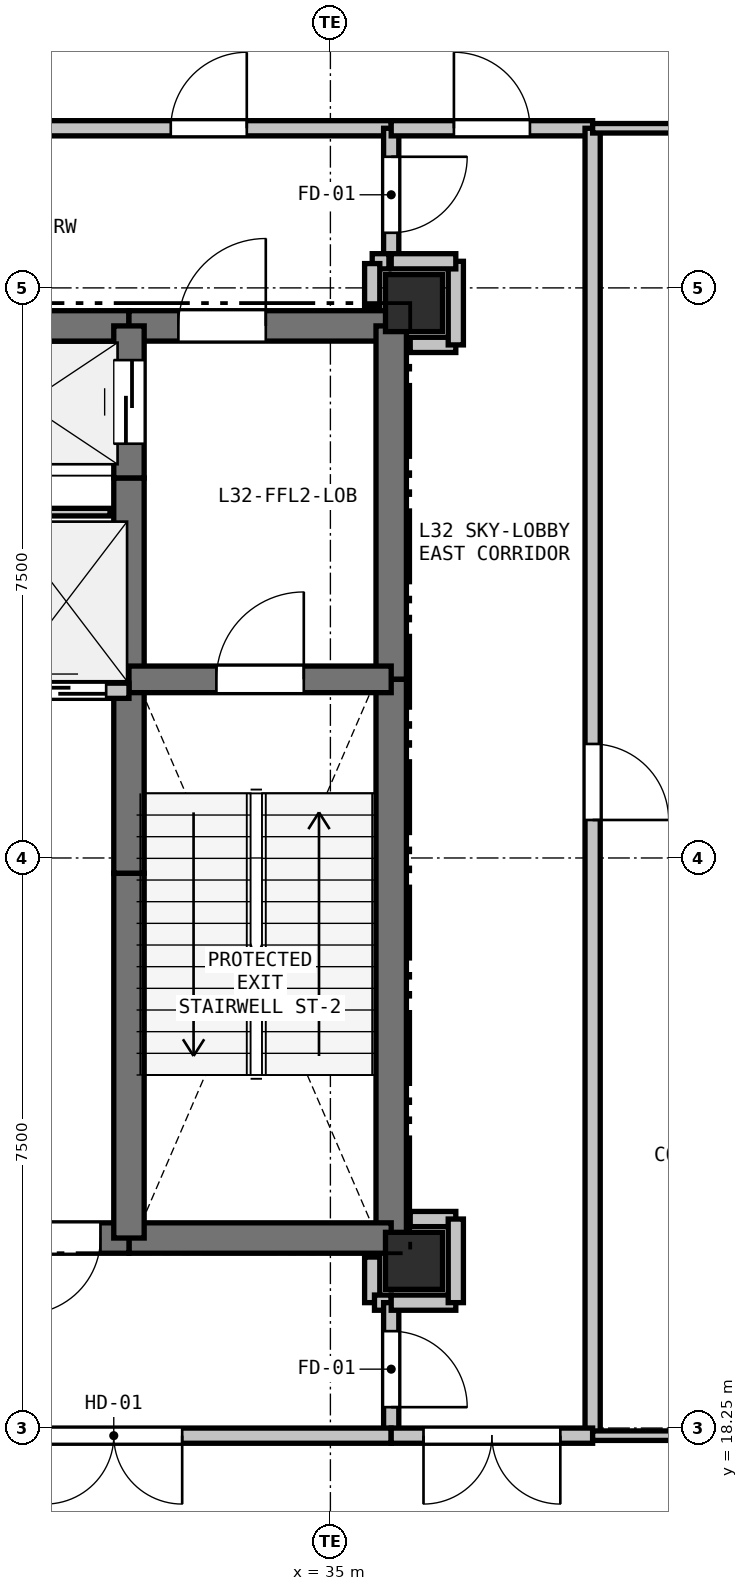
"""IFC4 building model, lengths in metres.
Left out: names, types, materials, properties, quantities, classifications, styles, units other than length and angle.
Written with IfcOpenShell. Run it as: python <this file> out.ifc"""

import sys

from ifc_helpers import new_model, si_unit, direction, frame, frame_2d, origin, origin_2d, place, context, subcontext, project, spatial, rectangle, extrude, element, fill, save


model = new_model("IFC4")
c1 = context("Model", 3, precision=1e-05, world=origin(), true_north=direction((0.0, 1.0)))
c2 = subcontext(c1, "Body", "Model", "MODEL_VIEW")
j1 = project(units=[si_unit("LENGTHUNIT", "METRE"), si_unit("PLANEANGLEUNIT", "RADIAN")], contexts=[c1])
p1 = place(None, origin())
s1 = spatial("IfcSite", under=j1, at=p1, CompositionType="ELEMENT")
p2 = place(p1, origin())
s2 = spatial("IfcBuilding", under=s1, at=p2, CompositionType="ELEMENT")
p3 = place(p2, frame((0.0, 0.0, 116.4)))
s3 = spatial("IfcBuildingStorey", under=s2, at=p3, CompositionType="ELEMENT", Elevation=116.4)
for number, where, z_axis, x_axis in (
    (1, (36.1, 33.05, 0.0), (0.0, 0.0, 1.0), (1.0, 0.0, 0.0)),
    (2, (36.1, 20.45, 0.0), (0.0, 0.0, 1.0), (1.0, 0.0, 0.0)),
):
    element("IfcColumn", number, at=place(p3, frame(where, z_axis=z_axis, x_axis=x_axis)), inside=s3, PredefinedType="COLUMN", context=c2, shape_type="SweptSolid", body=[
        extrude(rectangle(XDim=0.75, YDim=0.75, at=origin_2d()), origin(), (0.0, 0.0, 1.0), 4.8),
    ])
p4 = place(p3, frame((29.65, 32.75, 0.0), z_axis=(0.0, 0.0, 1.0), x_axis=(1.0, 0.0, 0.0)))
e3 = element("IfcWall", 3, at=p4, inside=s3, PredefinedType="SHEAR", context=c2, shape_type="SweptSolid", body=[
    extrude(rectangle(XDim=2.7, YDim=0.4, at=frame_2d((1.35, 0.0))), origin(), (0.0, 0.0, 1.0), 4.56),
])
p5 = place(p3, frame((32.35, 32.75, 0.0), z_axis=(0.0, 0.0, 1.0), x_axis=(1.0, 0.0, 0.0)))
e4 = element("IfcWall", 4, at=p5, inside=s3, PredefinedType="SHEAR", context=c2, shape_type="SweptSolid", body=[
    extrude(rectangle(XDim=3.45, YDim=0.4, at=frame_2d((1.725, 0.0))), origin(), (0.0, 0.0, 1.0), 4.56),
])
p6 = place(p5, frame((0.65, 0.0, 0.0)))
e5 = element("IfcOpeningElement", 5, at=p6, cuts=e4, PredefinedType="OPENING", context=c2, shape_type="SweptSolid", body=[
    extrude(rectangle(XDim=1.15, YDim=2.15, at=frame_2d((0.575, 1.075))), frame((0.0, 0.21, 0.0), z_axis=(0.0, -1.0, 0.0), x_axis=(1.0, 0.0, 0.0)), (0.0, 0.0, 1.0), 0.42),
])
p7 = place(p3, frame((35.8, 32.75, 0.0), z_axis=(0.0, 0.0, 1.0), x_axis=(0.0, -1.0, 0.0)))
e6 = element("IfcWall", 6, at=p7, inside=s3, PredefinedType="SHEAR", context=c2, shape_type="SweptSolid", body=[
    extrude(rectangle(XDim=4.65, YDim=0.4, at=frame_2d((2.325, 0.0))), origin(), (0.0, 0.0, 1.0), 4.56),
])
p8 = place(p3, frame((35.8, 28.1, 0.0), z_axis=(0.0, 0.0, 1.0), x_axis=(0.0, -1.0, 0.0)))
e7 = element("IfcWall", 7, at=p8, inside=s3, PredefinedType="SHEAR", context=c2, shape_type="SweptSolid", body=[
    extrude(rectangle(XDim=7.35, YDim=0.4, at=frame_2d((3.675, 0.0))), origin(), (0.0, 0.0, 1.0), 4.56),
])
p9 = place(p3, frame((35.8, 20.75, 0.0), z_axis=(0.0, 0.0, 1.0), x_axis=(-1.0, 0.0, 0.0)))
e8 = element("IfcWall", 8, at=p9, inside=s3, PredefinedType="SHEAR", context=c2, shape_type="SweptSolid", body=[
    extrude(rectangle(XDim=3.45, YDim=0.4, at=frame_2d((1.725, 0.0))), origin(), (0.0, 0.0, 1.0), 4.56),
])
p10 = place(p3, frame((32.35, 20.75, 0.0), z_axis=(0.0, 0.0, 1.0), x_axis=(-1.0, 0.0, 0.0)))
e9 = element("IfcWall", 9, at=p10, inside=s3, PredefinedType="SHEAR", context=c2, shape_type="SweptSolid", body=[
    extrude(rectangle(XDim=1.75, YDim=0.4, at=frame_2d((0.875, 0.0))), origin(), (0.0, 0.0, 1.0), 4.56),
])
p11 = place(p10, frame((0.375, 0.0, 0.0)))
e10 = element("IfcOpeningElement", 10, at=p11, cuts=e9, PredefinedType="OPENING", context=c2, shape_type="SweptSolid", body=[
    extrude(rectangle(XDim=1.0, YDim=2.15, at=frame_2d((0.5, 1.075))), frame((0.0, 0.21, 0.0), z_axis=(0.0, -1.0, 0.0), x_axis=(1.0, 0.0, 0.0)), (0.0, 0.0, 1.0), 0.42),
])
p12 = place(p3, frame((32.35, 20.75, 0.0), z_axis=(0.0, 0.0, 1.0), x_axis=(0.0, 1.0, 0.0)))
e11 = element("IfcWall", 11, at=p12, inside=s3, PredefinedType="SHEAR", context=c2, shape_type="SweptSolid", body=[
    extrude(rectangle(XDim=4.8, YDim=0.4, at=frame_2d((2.4, 0.0))), origin(), (0.0, 0.0, 1.0), 4.56),
])
p13 = place(p3, frame((32.35, 25.55, 0.0), z_axis=(0.0, 0.0, 1.0), x_axis=(0.0, 1.0, 0.0)))
e12 = element("IfcWall", 12, at=p13, inside=s3, PredefinedType="SHEAR", context=c2, shape_type="SweptSolid", body=[
    extrude(rectangle(XDim=2.4, YDim=0.4, at=frame_2d((1.2, 0.0))), origin(), (0.0, 0.0, 1.0), 4.56),
])
p14 = place(p3, frame((32.35, 27.95, 0.0), z_axis=(0.0, 0.0, 1.0), x_axis=(0.0, 1.0, 0.0)))
e13 = element("IfcWall", 13, at=p14, inside=s3, PredefinedType="SHEAR", context=c2, shape_type="SweptSolid", body=[
    extrude(rectangle(XDim=2.8, YDim=0.4, at=frame_2d((1.4, 0.0))), origin(), (0.0, 0.0, 1.0), 4.56),
])
p15 = place(p3, frame((32.35, 30.75, 0.0), z_axis=(0.0, 0.0, 1.0), x_axis=(0.0, 1.0, 0.0)))
e14 = element("IfcWall", 14, at=p15, inside=s3, PredefinedType="SHEAR", context=c2, shape_type="SweptSolid", body=[
    extrude(rectangle(XDim=2.0, YDim=0.4, at=frame_2d((1.0, 0.0))), origin(), (0.0, 0.0, 1.0), 4.56),
])
p16 = place(p15, frame((0.45, 0.0, 0.0)))
e15 = element("IfcOpeningElement", 15, at=p16, cuts=e14, PredefinedType="OPENING", context=c2, shape_type="SweptSolid", body=[
    extrude(rectangle(XDim=1.1, YDim=2.15, at=frame_2d((0.55, 1.075))), frame((0.0, 0.21, 0.0), z_axis=(0.0, -1.0, 0.0), x_axis=(1.0, 0.0, 0.0)), (0.0, 0.0, 1.0), 0.42),
])
p17 = place(p3, frame((32.35, 28.1, 0.0), z_axis=(0.0, 0.0, 1.0), x_axis=(1.0, 0.0, 0.0)))
e16 = element("IfcWall", 16, at=p17, inside=s3, PredefinedType="SHEAR", context=c2, shape_type="SweptSolid", body=[
    extrude(rectangle(XDim=3.45, YDim=0.35, at=frame_2d((1.725, 0.0))), origin(), (0.0, 0.0, 1.0), 4.56),
])
p18 = place(p17, frame((1.15, 0.0, 0.0)))
e17 = element("IfcOpeningElement", 17, at=p18, cuts=e16, PredefinedType="OPENING", context=c2, shape_type="SweptSolid", body=[
    extrude(rectangle(XDim=1.15, YDim=2.15, at=frame_2d((0.575, 1.075))), frame((0.0, 0.185, 0.0), z_axis=(0.0, -1.0, 0.0), x_axis=(1.0, 0.0, 0.0)), (0.0, 0.0, 1.0), 0.37),
])
p19 = place(p3, frame((27.4, 27.95, 0.0), z_axis=(0.0, 0.0, 1.0), x_axis=(1.0, 0.0, 0.0)))
e18 = element("IfcWall", 18, at=p19, inside=s3, PredefinedType="PARTITIONING", context=c2, shape_type="SweptSolid", body=[
    extrude(rectangle(XDim=4.95, YDim=0.2, at=frame_2d((2.475, 0.0))), origin(), (0.0, 0.0, 1.0), 4.56),
])
p20 = place(p19, frame((0.25, 0.0, 0.0)))
e19 = element("IfcOpeningElement", 19, at=p20, cuts=e18, PredefinedType="OPENING", context=c2, shape_type="SweptSolid", body=[
    extrude(rectangle(XDim=1.1, YDim=2.15, at=frame_2d((0.55, 1.075))), frame((0.0, 0.11, 0.0), z_axis=(0.0, -1.0, 0.0), x_axis=(1.0, 0.0, 0.0)), (0.0, 0.0, 1.0), 0.22),
])
p21 = place(p19, frame((1.9, 0.0, 0.0)))
e20 = element("IfcOpeningElement", 20, at=p21, cuts=e18, PredefinedType="OPENING", context=c2, shape_type="SweptSolid", body=[
    extrude(rectangle(XDim=1.1, YDim=2.15, at=frame_2d((0.55, 1.075))), frame((0.0, 0.11, 0.0), z_axis=(0.0, -1.0, 0.0), x_axis=(1.0, 0.0, 0.0)), (0.0, 0.0, 1.0), 0.22),
])
p22 = place(p19, frame((3.55, 0.0, 0.0)))
e21 = element("IfcOpeningElement", 21, at=p22, cuts=e18, PredefinedType="OPENING", context=c2, shape_type="SweptSolid", body=[
    extrude(rectangle(XDim=1.1, YDim=2.15, at=frame_2d((0.55, 1.075))), frame((0.0, 0.11, 0.0), z_axis=(0.0, -1.0, 0.0), x_axis=(1.0, 0.0, 0.0)), (0.0, 0.0, 1.0), 0.22),
])
p23 = place(p3, frame((32.1, 30.3, 0.0), z_axis=(0.0, 0.0, 1.0), x_axis=(-1.0, 0.0, 0.0)))
e22 = element("IfcWall", 22, at=p23, inside=s3, PredefinedType="PARTITIONING", context=c2, shape_type="SweptSolid", body=[
    extrude(rectangle(XDim=1.4, YDim=0.1, at=frame_2d((0.7, 0.0))), origin(), (0.0, 0.0, 1.0), 4.56),
])
p24 = place(p3, frame((35.55, 20.5, 0.0), z_axis=(0.0, 0.0, 1.0), x_axis=(0.0, -1.0, 0.0)))
e23 = element("IfcWall", 23, at=p24, inside=s3, PredefinedType="PARTITIONING", context=c2, shape_type="SweptSolid", body=[
    extrude(rectangle(XDim=0.6, YDim=0.2, at=frame_2d((0.3, 0.0))), origin(), (0.0, 0.0, 1.0), 4.008),
])
p25 = place(p3, frame((35.58, 19.9, 0.0), z_axis=(0.0, 0.0, 1.0), x_axis=(1.0, 0.0, 0.0)))
e24 = element("IfcWall", 24, at=p25, inside=s3, PredefinedType="PARTITIONING", context=c2, shape_type="SweptSolid", body=[
    extrude(rectangle(XDim=0.22, YDim=0.2, at=frame_2d((0.11, 0.0))), origin(), (0.0, 0.0, 1.0), 4.56),
])
p26 = place(p3, frame((35.8, 19.9, 0.0), z_axis=(0.0, 0.0, 1.0), x_axis=(0.0, -1.0, 0.0)))
e25 = element("IfcWall", 25, at=p26, inside=s3, PredefinedType="PARTITIONING", context=c2, shape_type="SweptSolid", body=[
    extrude(rectangle(XDim=1.75, YDim=0.2, at=frame_2d((0.875, 0.0))), origin(), (0.0, 0.0, 1.0), 3.195),
])
p27 = place(p26, frame((0.375, 0.0, 0.0)))
e26 = element("IfcOpeningElement", 26, at=p27, cuts=e25, PredefinedType="OPENING", context=c2, shape_type="SweptSolid", body=[
    extrude(rectangle(XDim=1.0, YDim=2.15, at=frame_2d((0.5, 1.075))), frame((0.0, 0.11, 0.0), z_axis=(0.0, -1.0, 0.0), x_axis=(1.0, 0.0, 0.0)), (0.0, 0.0, 1.0), 0.22),
])
p28 = place(p3, frame((35.8, 18.15, 0.0), z_axis=(0.0, 0.0, 1.0), x_axis=(-1.0, 0.0, 0.0)))
e27 = element("IfcWall", 27, at=p28, inside=s3, PredefinedType="PARTITIONING", context=c2, shape_type="SweptSolid", body=[
    extrude(rectangle(XDim=7.3, YDim=0.2, at=frame_2d((3.65, 0.0))), origin(), (0.0, 0.0, 1.0), 2.945),
])
p29 = place(p28, frame((2.75, 0.0, 0.0)))
e28 = element("IfcOpeningElement", 28, at=p29, cuts=e27, PredefinedType="OPENING", context=c2, shape_type="SweptSolid", body=[
    extrude(rectangle(XDim=1.8, YDim=2.2, at=frame_2d((0.9, 1.1))), frame((0.0, 0.11, 0.0), z_axis=(0.0, -1.0, 0.0), x_axis=(1.0, 0.0, 0.0)), (0.0, 0.0, 1.0), 0.22),
])
p30 = place(p3, frame((31.0, 35.35, 0.0), z_axis=(0.0, 0.0, 1.0), x_axis=(1.0, 0.0, 0.0)))
e29 = element("IfcWall", 29, at=p30, inside=s3, PredefinedType="PARTITIONING", context=c2, shape_type="SweptSolid", body=[
    extrude(rectangle(XDim=4.8, YDim=0.2, at=frame_2d((2.4, 0.0))), origin(), (0.0, 0.0, 1.0), 2.945),
])
p31 = place(p30, frame((1.9, 0.0, 0.0)))
e30 = element("IfcOpeningElement", 30, at=p31, cuts=e29, PredefinedType="OPENING", context=c2, shape_type="SweptSolid", body=[
    extrude(rectangle(XDim=1.0, YDim=2.15, at=frame_2d((0.5, 1.075))), frame((0.0, 0.11, 0.0), z_axis=(0.0, -1.0, 0.0), x_axis=(1.0, 0.0, 0.0)), (0.0, 0.0, 1.0), 0.22),
])
p32 = place(p3, frame((35.8, 35.35, 0.0), z_axis=(0.0, 0.0, 1.0), x_axis=(0.0, -1.0, 0.0)))
e31 = element("IfcWall", 31, at=p32, inside=s3, PredefinedType="PARTITIONING", context=c2, shape_type="SweptSolid", body=[
    extrude(rectangle(XDim=1.75, YDim=0.2, at=frame_2d((0.875, 0.0))), origin(), (0.0, 0.0, 1.0), 2.945),
])
p33 = place(p32, frame((0.375, 0.0, 0.0)))
e32 = element("IfcOpeningElement", 32, at=p33, cuts=e31, PredefinedType="OPENING", context=c2, shape_type="SweptSolid", body=[
    extrude(rectangle(XDim=1.0, YDim=2.15, at=frame_2d((0.5, 1.075))), frame((0.0, 0.11, 0.0), z_axis=(0.0, -1.0, 0.0), x_axis=(1.0, 0.0, 0.0)), (0.0, 0.0, 1.0), 0.22),
])
p34 = place(p3, frame((35.77, 33.6, 0.0), z_axis=(0.0, 0.0, 1.0), x_axis=(-1.0, 0.0, 0.0)))
e33 = element("IfcWall", 33, at=p34, inside=s3, PredefinedType="PARTITIONING", context=c2, shape_type="SweptSolid", body=[
    extrude(rectangle(XDim=0.22, YDim=0.2, at=frame_2d((0.11, 0.0))), origin(), (0.0, 0.0, 1.0), 3.195),
])
p35 = place(p3, frame((35.55, 33.57, 0.0), z_axis=(0.0, 0.0, 1.0), x_axis=(0.0, -1.0, 0.0)))
e34 = element("IfcWall", 34, at=p35, inside=s3, PredefinedType="PARTITIONING", context=c2, shape_type="SweptSolid", body=[
    extrude(rectangle(XDim=0.57, YDim=0.2, at=frame_2d((0.285, 0.0))), origin(), (0.0, 0.0, 1.0), 3.195),
])
for number, where, z_axis, x_axis in (
    (35, (36.65, 21.0, 0.0), (0.0, 0.0, 1.0), (-1.0, 0.0, 0.0)),
    (36, (36.05, 32.5, 0.0), (0.0, 0.0, 1.0), (1.0, 0.0, 0.0)),
):
    element("IfcWall", number, at=place(p3, frame(where, z_axis=z_axis, x_axis=x_axis)), inside=s3, PredefinedType="PARTITIONING", context=c2, shape_type="SweptSolid", body=[
        extrude(rectangle(XDim=0.6, YDim=0.2, at=frame_2d((0.3, 0.0))), origin(), (0.0, 0.0, 1.0), 4.008),
    ])
p36 = place(p3, frame((36.65, 32.5, 0.0), z_axis=(0.0, 0.0, 1.0), x_axis=(0.0, 1.0, 0.0)))
e37 = element("IfcWall", 37, at=p36, inside=s3, PredefinedType="PARTITIONING", context=c2, shape_type="SweptSolid", body=[
    extrude(rectangle(XDim=1.1, YDim=0.2, at=frame_2d((0.55, 0.0))), origin(), (0.0, 0.0, 1.0), 3.195),
])
p37 = place(p3, frame((36.65, 33.6, 0.0), z_axis=(0.0, 0.0, 1.0), x_axis=(-1.0, 0.0, 0.0)))
e38 = element("IfcWall", 38, at=p37, inside=s3, PredefinedType="PARTITIONING", context=c2, shape_type="SweptSolid", body=[
    extrude(rectangle(XDim=0.85, YDim=0.2, at=frame_2d((0.425, 0.0))), origin(), (0.0, 0.0, 1.0), 3.195),
])
p38 = place(p3, frame((35.8, 35.35, 0.0), z_axis=(0.0, 0.0, 1.0), x_axis=(1.0, 0.0, 0.0)))
e39 = element("IfcWall", 39, at=p38, inside=s3, PredefinedType="PARTITIONING", context=c2, shape_type="SweptSolid", body=[
    extrude(rectangle(XDim=2.65, YDim=0.2, at=frame_2d((1.325, 0.0))), origin(), (0.0, 0.0, 1.0), 2.945),
])
p39 = place(p38, frame((0.825, 0.0, 0.0)))
e40 = element("IfcOpeningElement", 40, at=p39, cuts=e39, PredefinedType="OPENING", context=c2, shape_type="SweptSolid", body=[
    extrude(rectangle(XDim=1.0, YDim=2.15, at=frame_2d((0.5, 1.075))), frame((0.0, 0.11, 0.0), z_axis=(0.0, -1.0, 0.0), x_axis=(1.0, 0.0, 0.0)), (0.0, 0.0, 1.0), 0.22),
])
p40 = place(p3, frame((38.45, 35.35, 0.0), z_axis=(0.0, 0.0, 1.0), x_axis=(0.0, -1.0, 0.0)))
e41 = element("IfcWall", 41, at=p40, inside=s3, PredefinedType="PARTITIONING", context=c2, shape_type="SweptSolid", body=[
    extrude(rectangle(XDim=17.2, YDim=0.2, at=frame_2d((8.6, 0.0))), origin(), (0.0, 0.0, 1.0), 3.195),
])
p41 = place(p40, frame((8.1, 0.0, 0.0)))
e42 = element("IfcOpeningElement", 42, at=p41, cuts=e41, PredefinedType="OPENING", context=c2, shape_type="SweptSolid", body=[
    extrude(rectangle(XDim=1.0, YDim=2.15, at=frame_2d((0.5, 1.075))), frame((0.0, 0.11, 0.0), z_axis=(0.0, -1.0, 0.0), x_axis=(1.0, 0.0, 0.0)), (0.0, 0.0, 1.0), 0.22),
])
p42 = place(p3, frame((38.45, 18.15, 0.0), z_axis=(0.0, 0.0, 1.0), x_axis=(-1.0, 0.0, 0.0)))
e43 = element("IfcWall", 43, at=p42, inside=s3, PredefinedType="PARTITIONING", context=c2, shape_type="SweptSolid", body=[
    extrude(rectangle(XDim=2.65, YDim=0.2, at=frame_2d((1.325, 0.0))), origin(), (0.0, 0.0, 1.0), 3.195),
])
p43 = place(p42, frame((0.425, 0.0, 0.0)))
e44 = element("IfcOpeningElement", 44, at=p43, cuts=e43, PredefinedType="OPENING", context=c2, shape_type="SweptSolid", body=[
    extrude(rectangle(XDim=1.8, YDim=2.2, at=frame_2d((0.9, 1.1))), frame((0.0, 0.11, 0.0), z_axis=(0.0, -1.0, 0.0), x_axis=(1.0, 0.0, 0.0)), (0.0, 0.0, 1.0), 0.22),
])
p44 = place(p3, frame((35.8, 19.9, 0.0), z_axis=(0.0, 0.0, 1.0), x_axis=(1.0, 0.0, 0.0)))
e45 = element("IfcWall", 45, at=p44, inside=s3, PredefinedType="PARTITIONING", context=c2, shape_type="SweptSolid", body=[
    extrude(rectangle(XDim=0.85, YDim=0.2, at=frame_2d((0.425, 0.0))), origin(), (0.0, 0.0, 1.0), 4.56),
])
p45 = place(p3, frame((36.65, 19.9, 0.0), z_axis=(0.0, 0.0, 1.0), x_axis=(0.0, 1.0, 0.0)))
e46 = element("IfcWall", 46, at=p45, inside=s3, PredefinedType="PARTITIONING", context=c2, shape_type="SweptSolid", body=[
    extrude(rectangle(XDim=1.1, YDim=0.2, at=frame_2d((0.55, 0.0))), origin(), (0.0, 0.0, 1.0), 4.56),
])
for number, where, z_axis, x_axis in (
    (47, (42.885, 35.35, 0.0), (0.0, 0.0, 1.0), (-1.0, 0.0, 0.0)),
    (48, (42.885, 18.15, 0.0), (0.0, 0.0, 1.0), (-1.0, 0.0, 0.0)),
):
    element("IfcWall", number, at=place(p3, frame(where, z_axis=z_axis, x_axis=x_axis)), inside=s3, PredefinedType="PARTITIONING", context=c2, shape_type="SweptSolid", body=[
        extrude(rectangle(XDim=4.436, YDim=0.125, at=frame_2d((2.218, 0.0))), origin(), (0.0, 0.0, 1.0), 2.365),
    ])
p46 = place(p22, origin())
e49 = element("IfcDoor", 49, at=p46, inside=s3, OperationType="SLIDING_TO_LEFT", PredefinedType="DOOR", context=c2, shape_type="SweptSolid", body=[
    extrude(rectangle(XDim=1.1, YDim=2.15, at=frame_2d((0.55, 1.075))), frame((0.0, 0.025, 0.0), z_axis=(0.0, -1.0, 0.0), x_axis=(1.0, 0.0, 0.0)), (0.0, 0.0, 1.0), 0.05),
])
fill(e21, e49)
p47 = place(p11, origin())
e50 = element("IfcDoor", 50, at=p47, inside=s3, OperationType="SINGLE_SWING_RIGHT", PredefinedType="DOOR", context=c2, shape_type="SweptSolid", body=[
    extrude(rectangle(XDim=1.0, YDim=2.15, at=frame_2d((0.5, 1.075))), frame((0.0, 0.025, 0.0), z_axis=(0.0, -1.0, 0.0), x_axis=(1.0, 0.0, 0.0)), (0.0, 0.0, 1.0), 0.05),
])
fill(e10, e50)
p48 = place(p16, origin())
e51 = element("IfcDoor", 51, at=p48, inside=s3, OperationType="SLIDING_TO_LEFT", PredefinedType="DOOR", context=c2, shape_type="SweptSolid", body=[
    extrude(rectangle(XDim=1.1, YDim=2.15, at=frame_2d((0.55, 1.075))), frame((0.0, 0.025, 0.0), z_axis=(0.0, -1.0, 0.0), x_axis=(1.0, 0.0, 0.0)), (0.0, 0.0, 1.0), 0.05),
])
fill(e15, e51)
p49 = place(p18, origin())
e52 = element("IfcDoor", 52, at=p49, inside=s3, OperationType="SINGLE_SWING_RIGHT", PredefinedType="DOOR", context=c2, shape_type="SweptSolid", body=[
    extrude(rectangle(XDim=1.15, YDim=2.15, at=frame_2d((0.575, 1.075))), frame((0.0, 0.025, 0.0), z_axis=(0.0, -1.0, 0.0), x_axis=(1.0, 0.0, 0.0)), (0.0, 0.0, 1.0), 0.05),
])
fill(e17, e52)
p50 = place(p6, origin())
e53 = element("IfcDoor", 53, at=p50, inside=s3, OperationType="SINGLE_SWING_RIGHT", PredefinedType="DOOR", context=c2, shape_type="SweptSolid", body=[
    extrude(rectangle(XDim=1.15, YDim=2.15, at=frame_2d((0.575, 1.075))), frame((0.0, 0.025, 0.0), z_axis=(0.0, -1.0, 0.0), x_axis=(1.0, 0.0, 0.0)), (0.0, 0.0, 1.0), 0.05),
])
fill(e5, e53)
p51 = place(p27, origin())
e54 = element("IfcDoor", 54, at=p51, inside=s3, OperationType="SINGLE_SWING_RIGHT", PredefinedType="DOOR", context=c2, shape_type="SweptSolid", body=[
    extrude(rectangle(XDim=1.0, YDim=2.15, at=frame_2d((0.5, 1.075))), frame((0.0, 0.025, 0.0), z_axis=(0.0, -1.0, 0.0), x_axis=(1.0, 0.0, 0.0)), (0.0, 0.0, 1.0), 0.05),
])
fill(e26, e54)
p52 = place(p33, origin())
e55 = element("IfcDoor", 55, at=p52, inside=s3, OperationType="SINGLE_SWING_LEFT", PredefinedType="DOOR", context=c2, shape_type="SweptSolid", body=[
    extrude(rectangle(XDim=1.0, YDim=2.15, at=frame_2d((0.5, 1.075))), frame((0.0, 0.025, 0.0), z_axis=(0.0, -1.0, 0.0), x_axis=(1.0, 0.0, 0.0)), (0.0, 0.0, 1.0), 0.05),
])
fill(e32, e55)
p53 = place(p31, origin())
e56 = element("IfcDoor", 56, at=p53, inside=s3, OperationType="SINGLE_SWING_RIGHT", PredefinedType="DOOR", context=c2, shape_type="SweptSolid", body=[
    extrude(rectangle(XDim=1.0, YDim=2.15, at=frame_2d((0.5, 1.075))), frame((0.0, 0.025, 0.0), z_axis=(0.0, -1.0, 0.0), x_axis=(1.0, 0.0, 0.0)), (0.0, 0.0, 1.0), 0.05),
])
fill(e30, e56)
p54 = place(p29, origin())
e57 = element("IfcDoor", 57, at=p54, inside=s3, OperationType="DOUBLE_DOOR_SINGLE_SWING", PredefinedType="DOOR", context=c2, shape_type="SweptSolid", body=[
    extrude(rectangle(XDim=1.8, YDim=2.2, at=frame_2d((0.9, 1.1))), frame((0.0, 0.025, 0.0), z_axis=(0.0, -1.0, 0.0), x_axis=(1.0, 0.0, 0.0)), (0.0, 0.0, 1.0), 0.05),
])
fill(e28, e57)
p55 = place(p39, origin())
e58 = element("IfcDoor", 58, at=p55, inside=s3, OperationType="SINGLE_SWING_LEFT", PredefinedType="DOOR", context=c2, shape_type="SweptSolid", body=[
    extrude(rectangle(XDim=1.0, YDim=2.15, at=frame_2d((0.5, 1.075))), frame((0.0, 0.025, 0.0), z_axis=(0.0, -1.0, 0.0), x_axis=(1.0, 0.0, 0.0)), (0.0, 0.0, 1.0), 0.05),
])
fill(e40, e58)
p56 = place(p41, origin())
e59 = element("IfcDoor", 59, at=p56, inside=s3, OperationType="SINGLE_SWING_RIGHT", PredefinedType="DOOR", context=c2, shape_type="SweptSolid", body=[
    extrude(rectangle(XDim=1.0, YDim=2.15, at=frame_2d((0.5, 1.075))), frame((0.0, 0.025, 0.0), z_axis=(0.0, -1.0, 0.0), x_axis=(1.0, 0.0, 0.0)), (0.0, 0.0, 1.0), 0.05),
])
fill(e42, e59)
p57 = place(p43, origin())
e60 = element("IfcDoor", 60, at=p57, inside=s3, OperationType="DOUBLE_DOOR_SINGLE_SWING", PredefinedType="DOOR", context=c2, shape_type="SweptSolid", body=[
    extrude(rectangle(XDim=1.8, YDim=2.2, at=frame_2d((0.9, 1.1))), frame((0.0, 0.025, 0.0), z_axis=(0.0, -1.0, 0.0), x_axis=(1.0, 0.0, 0.0)), (0.0, 0.0, 1.0), 0.05),
])
fill(e44, e60)
save(model, sys.argv[1])
